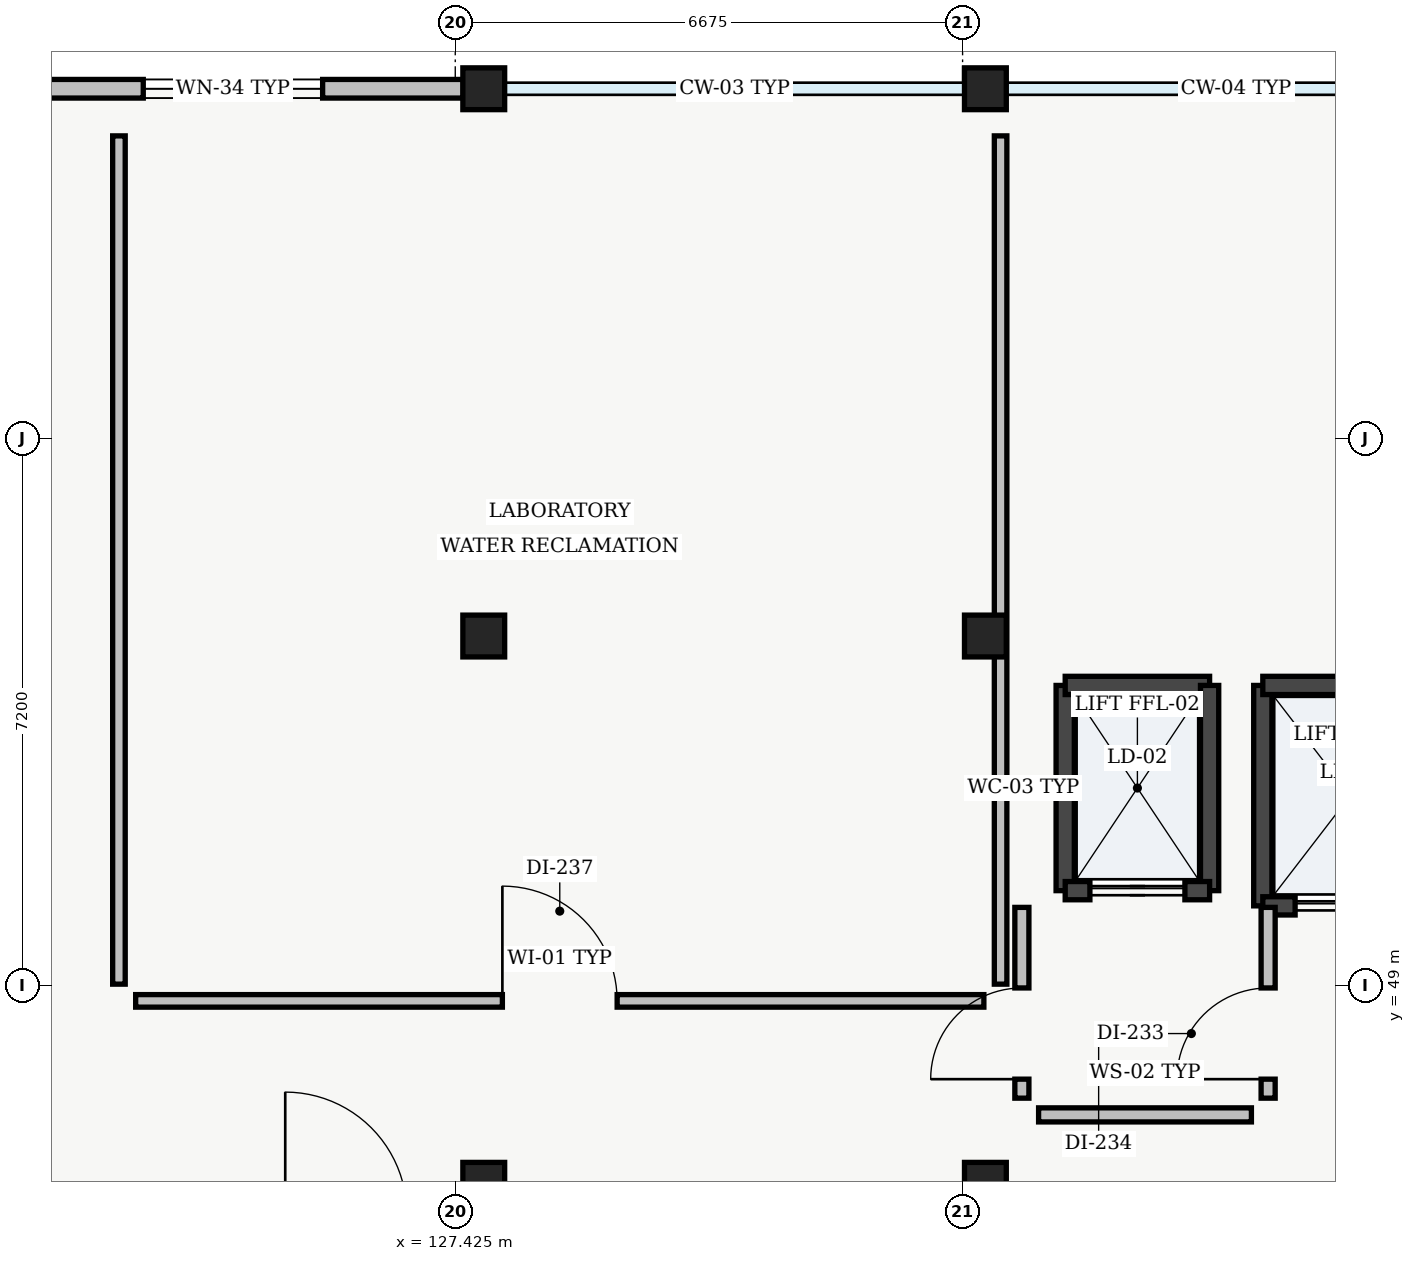
"""IFC4 building model, lengths in metres.
Left out: names, types, materials, properties, quantities, classifications, styles, units other than length and angle.
Written with IfcOpenShell. Run it as: python <this file> out.ifc"""

import sys

from ifc_helpers import new_model, si_unit, direction, frame, frame_2d, origin, origin_2d, place, context, subcontext, project, spatial, rectangle, extrude, element, fill, save


model = new_model("IFC4")
c1 = context("Model", 3, precision=1e-05, world=origin(), true_north=direction((0.0, 1.0)))
c2 = subcontext(c1, "Body", "Model", "MODEL_VIEW")
j1 = project(units=[si_unit("LENGTHUNIT", "METRE"), si_unit("PLANEANGLEUNIT", "RADIAN")], contexts=[c1])
p1 = place(None, origin())
s1 = spatial("IfcSite", under=j1, at=p1, CompositionType="ELEMENT")
p2 = place(p1, origin())
s2 = spatial("IfcBuilding", under=s1, at=p2, CompositionType="ELEMENT")
p3 = place(p2, frame((0.0, 0.0, 23.1)))
s3 = spatial("IfcBuildingStorey", under=s2, at=p3, CompositionType="ELEMENT", Elevation=23.1)
for number, where, z_axis, x_axis in (
    (1, (127.8, 46.4, 0.0), (0.0, 0.0, 1.0), (1.0, 0.0, 0.0)),
    (2, (127.8, 53.6, 0.0), (0.0, 0.0, 1.0), (1.0, 0.0, 0.0)),
    (3, (127.8, 60.8, 0.0), (0.0, 0.0, 1.0), (1.0, 0.0, 0.0)),
    (4, (134.4, 46.4, 0.0), (0.0, 0.0, 1.0), (1.0, 0.0, 0.0)),
    (5, (134.4, 53.6, 0.0), (0.0, 0.0, 1.0), (1.0, 0.0, 0.0)),
    (6, (134.4, 60.8, 0.0), (0.0, 0.0, 1.0), (1.0, 0.0, 0.0)),
):
    element("IfcColumn", number, at=place(p3, frame(where, z_axis=z_axis, x_axis=x_axis)), inside=s3, PredefinedType="COLUMN", context=c2, shape_type="SweptSolid", body=[
        extrude(rectangle(XDim=0.55, YDim=0.55, at=origin_2d()), origin(), (0.0, 0.0, 1.0), 4.29),
    ])
p4 = place(p3, frame((121.47, 60.8, 0.0), z_axis=(0.0, 0.0, 1.0), x_axis=(1.0, 0.0, 0.0)))
e7 = element("IfcWall", 7, at=p4, inside=s3, PredefinedType="STANDARD", context=c2, shape_type="SweptSolid", body=[
    extrude(rectangle(XDim=6.06, YDim=0.245, at=frame_2d((3.03, 0.0))), origin(), (0.0, 0.0, 1.0), 3.775),
])
p5 = place(p4, frame((1.85, 0.0, 0.95)))
e8 = element("IfcOpeningElement", 8, at=p5, cuts=e7, PredefinedType="OPENING", context=c2, shape_type="SweptSolid", body=[
    extrude(rectangle(XDim=2.36, YDim=1.36, at=frame_2d((1.18, 0.68))), frame((0.0, 0.123, 0.0), z_axis=(0.0, -1.0, 0.0), x_axis=(1.0, 0.0, 0.0)), (0.0, 0.0, 1.0), 0.245),
])
p6 = place(p3, frame((135.45, 50.25, 0.0), z_axis=(0.0, 0.0, 1.0), x_axis=(0.0, 1.0, 0.0)))
e9 = element("IfcWall", 9, at=p6, inside=s3, PredefinedType="SHEAR", context=c2, shape_type="SweptSolid", body=[
    extrude(rectangle(XDim=2.7, YDim=0.24, at=frame_2d((1.35, 0.0))), origin(), (0.0, 0.0, 1.0), 4.28),
])
p7 = place(p3, frame((135.45, 52.95, 0.0), z_axis=(0.0, 0.0, 1.0), x_axis=(1.0, 0.0, 0.0)))
e10 = element("IfcWall", 10, at=p7, inside=s3, PredefinedType="SHEAR", context=c2, shape_type="SweptSolid", body=[
    extrude(rectangle(XDim=1.9, YDim=0.24, at=frame_2d((0.95, 0.0))), origin(), (0.0, 0.0, 1.0), 4.28),
])
p8 = place(p3, frame((137.35, 52.95, 0.0), z_axis=(0.0, 0.0, 1.0), x_axis=(0.0, -1.0, 0.0)))
e11 = element("IfcWall", 11, at=p8, inside=s3, PredefinedType="SHEAR", context=c2, shape_type="SweptSolid", body=[
    extrude(rectangle(XDim=2.7, YDim=0.24, at=frame_2d((1.35, 0.0))), origin(), (0.0, 0.0, 1.0), 4.28),
])
p9 = place(p3, frame((137.35, 50.25, 0.0), z_axis=(0.0, 0.0, 1.0), x_axis=(-1.0, 0.0, 0.0)))
e12 = element("IfcWall", 12, at=p9, inside=s3, PredefinedType="SHEAR", context=c2, shape_type="SweptSolid", body=[
    extrude(rectangle(XDim=1.9, YDim=0.24, at=frame_2d((0.95, 0.0))), origin(), (0.0, 0.0, 1.0), 4.28),
])
p10 = place(p9, frame((0.325, 0.0, 0.0)))
e13 = element("IfcOpeningElement", 13, at=p10, cuts=e12, PredefinedType="OPENING", context=c2, shape_type="SweptSolid", body=[
    extrude(rectangle(XDim=1.25, YDim=2.2, at=frame_2d((0.625, 1.1))), frame((0.0, 0.12, 0.0), z_axis=(0.0, -1.0, 0.0), x_axis=(1.0, 0.0, 0.0)), (0.0, 0.0, 1.0), 0.24),
])
p11 = place(p3, frame((138.05, 50.05, 0.0), z_axis=(0.0, 0.0, 1.0), x_axis=(0.0, 1.0, 0.0)))
e14 = element("IfcWall", 14, at=p11, inside=s3, PredefinedType="SHEAR", context=c2, shape_type="SweptSolid", body=[
    extrude(rectangle(XDim=2.9, YDim=0.24, at=frame_2d((1.45, 0.0))), origin(), (0.0, 0.0, 1.0), 4.28),
])
p12 = place(p3, frame((138.05, 52.95, 0.0), z_axis=(0.0, 0.0, 1.0), x_axis=(1.0, 0.0, 0.0)))
e15 = element("IfcWall", 15, at=p12, inside=s3, PredefinedType="SHEAR", context=c2, shape_type="SweptSolid", body=[
    extrude(rectangle(XDim=2.3, YDim=0.24, at=frame_2d((1.15, 0.0))), origin(), (0.0, 0.0, 1.0), 4.28),
])
p13 = place(p3, frame((140.35, 50.05, 0.0), z_axis=(0.0, 0.0, 1.0), x_axis=(-1.0, 0.0, 0.0)))
e16 = element("IfcWall", 16, at=p13, inside=s3, PredefinedType="SHEAR", context=c2, shape_type="SweptSolid", body=[
    extrude(rectangle(XDim=2.3, YDim=0.24, at=frame_2d((1.15, 0.0))), origin(), (0.0, 0.0, 1.0), 4.28),
])
p14 = place(p13, frame((0.425, 0.0, 0.0)))
e17 = element("IfcOpeningElement", 17, at=p14, cuts=e16, PredefinedType="OPENING", context=c2, shape_type="SweptSolid", body=[
    extrude(rectangle(XDim=1.45, YDim=2.3, at=frame_2d((0.725, 1.15))), frame((0.0, 0.12, 0.0), z_axis=(0.0, -1.0, 0.0), x_axis=(1.0, 0.0, 0.0)), (0.0, 0.0, 1.0), 0.24),
])
p15 = place(p3, frame((135.1, 47.3, 0.0), z_axis=(0.0, 0.0, 1.0), x_axis=(1.0, 0.0, 0.0)))
e18 = element("IfcWall", 18, at=p15, inside=s3, PredefinedType="SOLIDWALL", context=c2, shape_type="SweptSolid", body=[
    extrude(rectangle(XDim=2.8, YDim=0.185, at=frame_2d((1.4, 0.0))), origin(), (0.0, 0.0, 1.0), 3.95),
])
p16 = place(p3, frame((138.12, 47.52, 0.0), z_axis=(0.0, 0.0, 1.0), x_axis=(0.0, 1.0, 0.0)))
e19 = element("IfcWall", 19, at=p16, inside=s3, PredefinedType="SOLIDWALL", context=c2, shape_type="SweptSolid", body=[
    extrude(rectangle(XDim=2.51, YDim=0.185, at=frame_2d((1.255, 0.0))), origin(), (0.0, 0.0, 1.0), 3.95),
])
p17 = place(p16, frame((0.25, 0.0, 0.0)))
e20 = element("IfcOpeningElement", 20, at=p17, cuts=e19, PredefinedType="OPENING", context=c2, shape_type="SweptSolid", body=[
    extrude(rectangle(XDim=1.2, YDim=2.15, at=frame_2d((0.6, 1.075))), frame((0.0, 0.093, 0.0), z_axis=(0.0, -1.0, 0.0), x_axis=(1.0, 0.0, 0.0)), (0.0, 0.0, 1.0), 0.185),
])
p18 = place(p3, frame((134.88, 50.03, 0.0), z_axis=(0.0, 0.0, 1.0), x_axis=(0.0, -1.0, 0.0)))
e21 = element("IfcWall", 21, at=p18, inside=s3, PredefinedType="SOLIDWALL", context=c2, shape_type="SweptSolid", body=[
    extrude(rectangle(XDim=2.51, YDim=0.185, at=frame_2d((1.255, 0.0))), origin(), (0.0, 0.0, 1.0), 3.95),
])
p19 = place(p18, frame((1.06, 0.0, 0.0)))
e22 = element("IfcOpeningElement", 22, at=p19, cuts=e21, PredefinedType="OPENING", context=c2, shape_type="SweptSolid", body=[
    extrude(rectangle(XDim=1.2, YDim=2.15, at=frame_2d((0.6, 1.075))), frame((0.0, 0.093, 0.0), z_axis=(0.0, -1.0, 0.0), x_axis=(1.0, 0.0, 0.0)), (0.0, 0.0, 1.0), 0.185),
])
p20 = place(p3, frame((123.22, 48.8, 0.0), z_axis=(0.0, 0.0, 1.0), x_axis=(1.0, 0.0, 0.0)))
e23 = element("IfcWall", 23, at=p20, inside=s3, PredefinedType="PARTITIONING", context=c2, shape_type="SweptSolid", body=[
    extrude(rectangle(XDim=11.16, YDim=0.165, at=frame_2d((5.58, 0.0))), origin(), (0.0, 0.0, 1.0), 3.825),
])
p21 = place(p20, frame((4.825, 0.0, 0.0)))
e24 = element("IfcOpeningElement", 24, at=p21, cuts=e23, PredefinedType="OPENING", context=c2, shape_type="SweptSolid", body=[
    extrude(rectangle(XDim=1.51, YDim=2.12, at=frame_2d((0.755, 1.06))), frame((0.0, 0.083, 0.0), z_axis=(0.0, -1.0, 0.0), x_axis=(1.0, 0.0, 0.0)), (0.0, 0.0, 1.0), 0.165),
])
p22 = place(p3, frame((134.6, 49.02, 0.0), z_axis=(0.0, 0.0, 1.0), x_axis=(0.0, 1.0, 0.0)))
e25 = element("IfcWall", 25, at=p22, inside=s3, PredefinedType="PARTITIONING", context=c2, shape_type="SweptSolid", body=[
    extrude(rectangle(XDim=11.16, YDim=0.165, at=frame_2d((5.58, 0.0))), origin(), (0.0, 0.0, 1.0), 3.675),
])
p23 = place(p3, frame((123.0, 60.18, 0.0), z_axis=(0.0, 0.0, 1.0), x_axis=(0.0, -1.0, 0.0)))
e26 = element("IfcWall", 26, at=p23, inside=s3, PredefinedType="PARTITIONING", context=c2, shape_type="SweptSolid", body=[
    extrude(rectangle(XDim=11.16, YDim=0.165, at=frame_2d((5.58, 0.0))), origin(), (0.0, 0.0, 1.0), 3.95),
])
p24 = place(p5, origin())
e27 = element("IfcWindow", 27, at=p24, inside=s3, PartitioningType="SINGLE_PANEL", PredefinedType="WINDOW", context=c2, shape_type="SweptSolid", body=[
    extrude(rectangle(XDim=2.36, YDim=1.36, at=frame_2d((1.18, 0.68))), frame((0.0, 0.03, 0.0), z_axis=(0.0, -1.0, 0.0), x_axis=(1.0, 0.0, 0.0)), (0.0, 0.0, 1.0), 0.06),
])
fill(e8, e27)
p25 = place(p10, origin())
e28 = element("IfcDoor", 28, at=p25, inside=s3, OperationType="SLIDING_TO_RIGHT", PredefinedType="DOOR", context=c2, shape_type="SweptSolid", body=[
    extrude(rectangle(XDim=1.25, YDim=2.2, at=frame_2d((0.625, 1.1))), frame((0.0, 0.025, 0.0), z_axis=(0.0, -1.0, 0.0), x_axis=(1.0, 0.0, 0.0)), (0.0, 0.0, 1.0), 0.05),
])
fill(e13, e28)
p26 = place(p14, origin())
e29 = element("IfcDoor", 29, at=p26, inside=s3, OperationType="DOUBLE_DOOR_SLIDING", PredefinedType="DOOR", context=c2, shape_type="SweptSolid", body=[
    extrude(rectangle(XDim=1.45, YDim=2.3, at=frame_2d((0.725, 1.15))), frame((0.0, 0.025, 0.0), z_axis=(0.0, -1.0, 0.0), x_axis=(1.0, 0.0, 0.0)), (0.0, 0.0, 1.0), 0.05),
])
fill(e17, e29)
p27 = place(p17, origin())
e30 = element("IfcDoor", 30, at=p27, inside=s3, OperationType="SINGLE_SWING_LEFT", PredefinedType="DOOR", context=c2, shape_type="SweptSolid", body=[
    extrude(rectangle(XDim=1.2, YDim=2.15, at=frame_2d((0.6, 1.075))), frame((0.0, 0.025, 0.0), z_axis=(0.0, -1.0, 0.0), x_axis=(1.0, 0.0, 0.0)), (0.0, 0.0, 1.0), 0.05),
])
fill(e20, e30)
p28 = place(p19, origin())
e31 = element("IfcDoor", 31, at=p28, inside=s3, OperationType="SINGLE_SWING_RIGHT", PredefinedType="DOOR", context=c2, shape_type="SweptSolid", body=[
    extrude(rectangle(XDim=1.2, YDim=2.15, at=frame_2d((0.6, 1.075))), frame((0.0, 0.025, 0.0), z_axis=(0.0, -1.0, 0.0), x_axis=(1.0, 0.0, 0.0)), (0.0, 0.0, 1.0), 0.05),
])
fill(e22, e31)
p29 = place(p21, origin())
e32 = element("IfcDoor", 32, at=p29, inside=s3, OperationType="SINGLE_SWING_LEFT", PredefinedType="DOOR", context=c2, shape_type="SweptSolid", body=[
    extrude(rectangle(XDim=1.51, YDim=2.12, at=frame_2d((0.755, 1.06))), frame((0.0, 0.025, 0.0), z_axis=(0.0, -1.0, 0.0), x_axis=(1.0, 0.0, 0.0)), (0.0, 0.0, 1.0), 0.05),
])
fill(e24, e32)
save(model, sys.argv[1])
